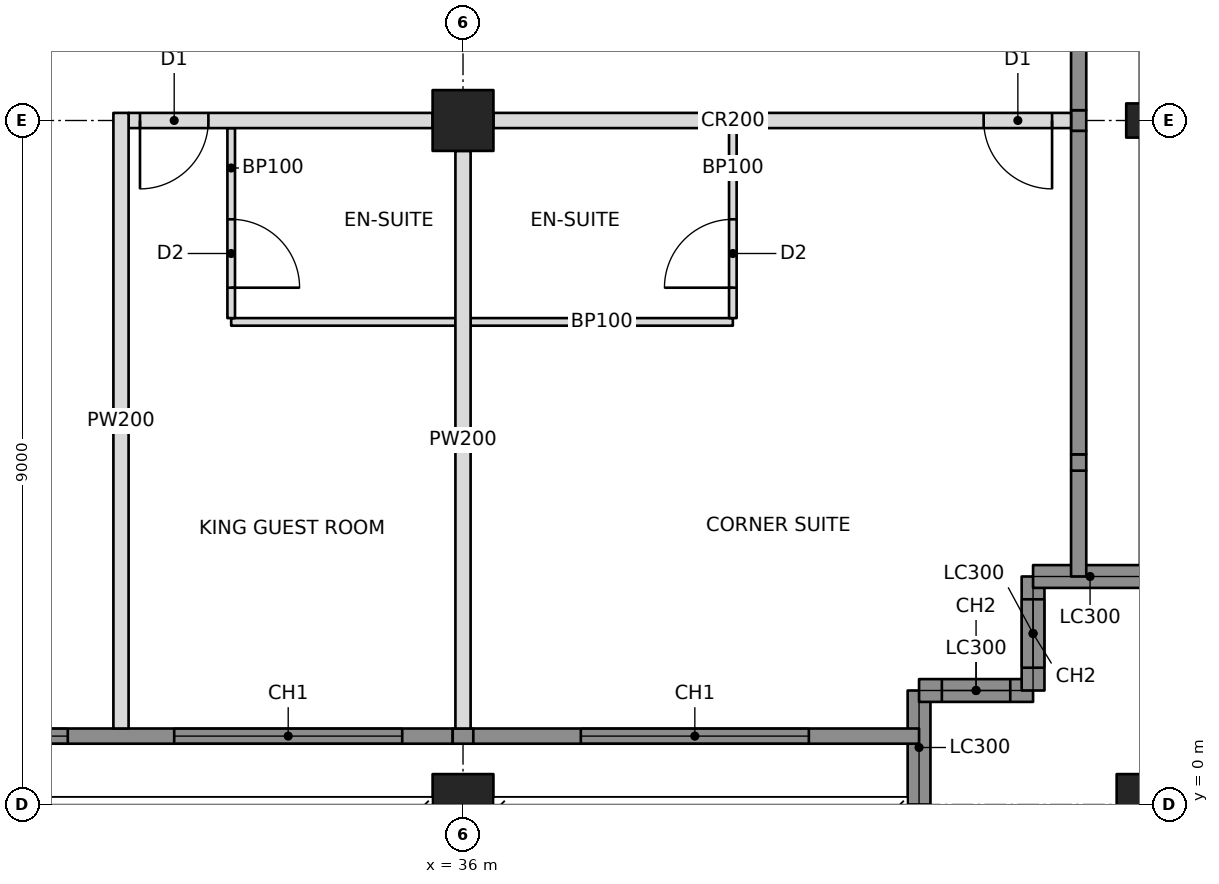
"""IFC4 building model, lengths in metres.
Left out: names, types, materials, properties, quantities, classifications, styles, units other than length and angle.
Written with IfcOpenShell. Run it as: python <this file> out.ifc"""

import sys

from ifc_helpers import new_model, si_unit, direction, frame, frame_2d, origin, origin_2d, place, context, subcontext, project, spatial, rectangle, hollow_rectangle, i_section, extrude, element, fill, save


model = new_model("IFC4")
c1 = context("Model", 3, precision=1e-05, world=origin(), true_north=direction((0.0, 1.0)))
c2 = subcontext(c1, "Body", "Model", "MODEL_VIEW")
j1 = project(units=[si_unit("LENGTHUNIT", "METRE"), si_unit("PLANEANGLEUNIT", "RADIAN")], contexts=[c1])
p1 = place(None, origin())
s1 = spatial("IfcSite", under=j1, at=p1, CompositionType="ELEMENT")
p2 = place(p1, origin())
s2 = spatial("IfcBuilding", under=s1, at=p2, CompositionType="ELEMENT")
p3 = place(p2, frame((0.0, 0.0, 170.6)))
s3 = spatial("IfcBuildingStorey", under=s2, at=p3, CompositionType="ELEMENT", Elevation=170.6)
p4 = place(p3, frame((36.0, 0.0, 0.0), z_axis=(0.0, 0.0, 1.0), x_axis=(1.0, 0.0, 0.0)))
e1 = element("IfcColumn", 1, at=p4, inside=s3, PredefinedType="COLUMN", context=c2, shape_type="SweptSolid", body=[
    extrude(hollow_rectangle(XDim=0.8, YDim=0.8, WallThickness=0.07, at=origin_2d()), origin(), (0.0, 0.0, 1.0), 3.4),
])
p5 = place(p3, frame((36.0, 9.0, 0.0), z_axis=(0.0, 0.0, 1.0), x_axis=(0.0, 1.0, 0.0)))
e2 = element("IfcColumn", 2, at=p5, inside=s3, PredefinedType="COLUMN", context=c2, shape_type="SweptSolid", body=[
    extrude(hollow_rectangle(XDim=0.8, YDim=0.8, WallThickness=0.06, at=origin_2d()), origin(), (0.0, 0.0, 1.0), 3.4),
])
p6 = place(p3, frame((45.0, 0.0, 0.0), z_axis=(0.0, 0.0, 1.0), x_axis=(1.0, 0.0, 0.0)))
e3 = element("IfcColumn", 3, at=p6, inside=s3, PredefinedType="COLUMN", context=c2, shape_type="SweptSolid", body=[
    extrude(hollow_rectangle(XDim=0.8, YDim=0.8, WallThickness=0.07, at=origin_2d()), origin(), (0.0, 0.0, 1.0), 3.4),
])
p7 = place(p3, frame((45.0, 9.0, 0.0), z_axis=(0.0, 0.0, 1.0), x_axis=(0.0, 1.0, 0.0)))
e4 = element("IfcColumn", 4, at=p7, inside=s3, PredefinedType="COLUMN", context=c2, shape_type="SweptSolid", body=[
    extrude(i_section(OverallWidth=0.449, OverallDepth=0.549, WebThickness=0.072, FlangeThickness=0.115, at=origin_2d()), origin(), (0.0, 0.0, 1.0), 3.4),
])
p8 = place(p3, frame((42.0, 0.0, 0.0), z_axis=(0.0, 0.0, 1.0), x_axis=(0.0, 1.0, 0.0)))
e5 = element("IfcWall", 5, at=p8, inside=s3, PredefinedType="SOLIDWALL", context=c2, shape_type="SweptSolid", body=[
    extrude(rectangle(XDim=1.5, YDim=0.3, at=frame_2d((0.75, 0.0))), origin(), (0.0, 0.0, 1.0), 2.42),
])
p9 = place(p3, frame((42.0, 1.5, 0.0), z_axis=(0.0, 0.0, 1.0), x_axis=(1.0, 0.0, 0.0)))
e6 = element("IfcWall", 6, at=p9, inside=s3, PredefinedType="SOLIDWALL", context=c2, shape_type="SweptSolid", body=[
    extrude(rectangle(XDim=1.5, YDim=0.3, at=frame_2d((0.75, 0.0))), origin(), (0.0, 0.0, 1.0), 3.2),
])
p10 = place(p9, frame((0.3, 0.0, 0.6)))
e7 = element("IfcOpeningElement", 7, at=p10, cuts=e6, PredefinedType="OPENING", context=c2, shape_type="SweptSolid", body=[
    extrude(rectangle(XDim=0.9, YDim=2.2, at=frame_2d((0.45, 1.1))), frame((0.0, 0.16, 0.0), z_axis=(0.0, -1.0, 0.0), x_axis=(1.0, 0.0, 0.0)), (0.0, 0.0, 1.0), 0.32),
])
p11 = place(p3, frame((43.5, 1.5, 0.0), z_axis=(0.0, 0.0, 1.0), x_axis=(0.0, 1.0, 0.0)))
e8 = element("IfcWall", 8, at=p11, inside=s3, PredefinedType="SOLIDWALL", context=c2, shape_type="SweptSolid", body=[
    extrude(rectangle(XDim=1.5, YDim=0.3, at=frame_2d((0.75, 0.0))), origin(), (0.0, 0.0, 1.0), 3.2),
])
p12 = place(p11, frame((0.3, 0.0, 0.6)))
e9 = element("IfcOpeningElement", 9, at=p12, cuts=e8, PredefinedType="OPENING", context=c2, shape_type="SweptSolid", body=[
    extrude(rectangle(XDim=0.9, YDim=2.2, at=frame_2d((0.45, 1.1))), frame((0.0, 0.16, 0.0), z_axis=(0.0, -1.0, 0.0), x_axis=(1.0, 0.0, 0.0)), (0.0, 0.0, 1.0), 0.32),
])
p13 = place(p3, frame((43.5, 3.0, 0.0), z_axis=(0.0, 0.0, 1.0), x_axis=(1.0, 0.0, 0.0)))
e10 = element("IfcWall", 10, at=p13, inside=s3, PredefinedType="SOLIDWALL", context=c2, shape_type="SweptSolid", body=[
    extrude(rectangle(XDim=1.5, YDim=0.3, at=frame_2d((0.75, 0.0))), origin(), (0.0, 0.0, 1.0), 2.42),
])
p14 = place(p3, frame((44.1, 3.0, 0.0), z_axis=(0.0, 0.0, 1.0), x_axis=(0.0, 1.0, 0.0)))
e11 = element("IfcWall", 11, at=p14, inside=s3, PredefinedType="SOLIDWALL", context=c2, shape_type="SweptSolid", body=[
    extrude(rectangle(XDim=1.393, YDim=0.2, at=frame_2d((0.696, 0.0))), origin(), (0.0, 0.0, 1.0), 3.2),
])
p15 = place(p3, frame((31.6, 9.0, 0.0), z_axis=(0.0, 0.0, 1.0), x_axis=(1.0, 0.0, 0.0)))
e12 = element("IfcWall", 12, at=p15, inside=s3, PredefinedType="PARTITIONING", context=c2, shape_type="SweptSolid", body=[
    extrude(rectangle(XDim=4.0, YDim=0.2, at=frame_2d((2.0, 0.0))), origin(), (0.0, 0.0, 1.0), 2.405),
])
p16 = place(p15, frame((0.15, 0.0, 0.0)))
e13 = element("IfcOpeningElement", 13, at=p16, cuts=e12, PredefinedType="OPENING", context=c2, shape_type="SweptSolid", body=[
    extrude(rectangle(XDim=0.9, YDim=2.1, at=frame_2d((0.45, 1.05))), frame((0.0, 0.11, 0.0), z_axis=(0.0, -1.0, 0.0), x_axis=(1.0, 0.0, 0.0)), (0.0, 0.0, 1.0), 0.22),
])
p17 = place(p3, frame((36.4, 9.0, 0.0), z_axis=(0.0, 0.0, 1.0), x_axis=(1.0, 0.0, 0.0)))
e14 = element("IfcWall", 14, at=p17, inside=s3, PredefinedType="PARTITIONING", context=c2, shape_type="SweptSolid", body=[
    extrude(rectangle(XDim=7.6, YDim=0.2, at=frame_2d((3.8, 0.0))), origin(), (0.0, 0.0, 1.0), 2.438),
])
p18 = place(p17, frame((6.45, 0.0, 0.0)))
e15 = element("IfcOpeningElement", 15, at=p18, cuts=e14, PredefinedType="OPENING", context=c2, shape_type="SweptSolid", body=[
    extrude(rectangle(XDim=0.9, YDim=2.1, at=frame_2d((0.45, 1.05))), frame((0.0, 0.11, 0.0), z_axis=(0.0, -1.0, 0.0), x_axis=(1.0, 0.0, 0.0)), (0.0, 0.0, 1.0), 0.22),
])
p19 = place(p3, frame((31.5, 9.1, 0.0), z_axis=(0.0, 0.0, 1.0), x_axis=(0.0, -1.0, 0.0)))
e16 = element("IfcWall", 16, at=p19, inside=s3, PredefinedType="PARTITIONING", context=c2, shape_type="SweptSolid", body=[
    extrude(rectangle(XDim=8.1, YDim=0.2, at=frame_2d((4.05, 0.0))), origin(), (0.0, 0.0, 1.0), 2.404),
])
p20 = place(p3, frame((36.0, 8.6, 0.0), z_axis=(0.0, 0.0, 1.0), x_axis=(0.0, -1.0, 0.0)))
e17 = element("IfcWall", 17, at=p20, inside=s3, PredefinedType="PARTITIONING", context=c2, shape_type="SweptSolid", body=[
    extrude(rectangle(XDim=7.6, YDim=0.2, at=frame_2d((3.8, 0.0))), origin(), (0.0, 0.0, 1.0), 2.438),
])
p21 = place(p3, frame((32.95, 6.35, 0.0), z_axis=(0.0, 0.0, 1.0), x_axis=(1.0, 0.0, 0.0)))
e18 = element("IfcWall", 18, at=p21, inside=s3, PredefinedType="PARTITIONING", context=c2, shape_type="SweptSolid", body=[
    extrude(rectangle(XDim=2.95, YDim=0.1, at=frame_2d((1.475, 0.0))), origin(), (0.0, 0.0, 1.0), 2.438),
])
p22 = place(p3, frame((32.95, 8.9, 0.0), z_axis=(0.0, 0.0, 1.0), x_axis=(0.0, -1.0, 0.0)))
e19 = element("IfcWall", 19, at=p22, inside=s3, PredefinedType="PARTITIONING", context=c2, shape_type="SweptSolid", body=[
    extrude(rectangle(XDim=2.5, YDim=0.1, at=frame_2d((1.25, 0.0))), origin(), (0.0, 0.0, 1.0), 2.404),
])
p23 = place(p22, frame((1.2, 0.0, 0.0)))
e20 = element("IfcOpeningElement", 20, at=p23, cuts=e19, PredefinedType="OPENING", context=c2, shape_type="SweptSolid", body=[
    extrude(rectangle(XDim=0.9, YDim=2.1, at=frame_2d((0.45, 1.05))), frame((0.0, 0.06, 0.0), z_axis=(0.0, -1.0, 0.0), x_axis=(1.0, 0.0, 0.0)), (0.0, 0.0, 1.0), 0.12),
])
p24 = place(p3, frame((36.1, 6.35, 0.0), z_axis=(0.0, 0.0, 1.0), x_axis=(1.0, 0.0, 0.0)))
e21 = element("IfcWall", 21, at=p24, inside=s3, PredefinedType="PARTITIONING", context=c2, shape_type="SweptSolid", body=[
    extrude(rectangle(XDim=3.45, YDim=0.1, at=frame_2d((1.725, 0.0))), origin(), (0.0, 0.0, 1.0), 2.438),
])
p25 = place(p3, frame((39.55, 8.9, 0.0), z_axis=(0.0, 0.0, 1.0), x_axis=(0.0, -1.0, 0.0)))
e22 = element("IfcWall", 22, at=p25, inside=s3, PredefinedType="PARTITIONING", context=c2, shape_type="SweptSolid", body=[
    extrude(rectangle(XDim=2.5, YDim=0.1, at=frame_2d((1.25, 0.0))), origin(), (0.0, 0.0, 1.0), 2.438),
])
p26 = place(p25, frame((1.2, 0.0, 0.0)))
e23 = element("IfcOpeningElement", 23, at=p26, cuts=e22, PredefinedType="OPENING", context=c2, shape_type="SweptSolid", body=[
    extrude(rectangle(XDim=0.9, YDim=2.1, at=frame_2d((0.45, 1.05))), frame((0.0, 0.06, 0.0), z_axis=(0.0, -1.0, 0.0), x_axis=(1.0, 0.0, 0.0)), (0.0, 0.0, 1.0), 0.12),
])
p27 = place(p3, frame((27.194, 0.9, 0.0), z_axis=(0.0, 0.0, 1.0), x_axis=(1.0, 0.0, 0.0)))
e24 = element("IfcWall", 24, at=p27, inside=s3, PredefinedType="SOLIDWALL", context=c2, shape_type="SweptSolid", body=[
    extrude(rectangle(XDim=8.671, YDim=0.2, at=frame_2d((4.335, 0.0))), origin(), (0.0, 0.0, 1.0), 3.2),
])
p28 = place(p27, frame((0.606, 0.0, 0.6)))
e25 = element("IfcOpeningElement", 25, at=p28, cuts=e24, PredefinedType="OPENING", context=c2, shape_type="SweptSolid", body=[
    extrude(rectangle(XDim=3.0, YDim=2.2, at=frame_2d((1.5, 1.1))), frame((0.0, 0.11, 0.0), z_axis=(0.0, -1.0, 0.0), x_axis=(1.0, 0.0, 0.0)), (0.0, 0.0, 1.0), 0.22),
])
p29 = place(p27, frame((5.006, 0.0, 0.6)))
e26 = element("IfcOpeningElement", 26, at=p29, cuts=e24, PredefinedType="OPENING", context=c2, shape_type="SweptSolid", body=[
    extrude(rectangle(XDim=3.0, YDim=2.2, at=frame_2d((1.5, 1.1))), frame((0.0, 0.11, 0.0), z_axis=(0.0, -1.0, 0.0), x_axis=(1.0, 0.0, 0.0)), (0.0, 0.0, 1.0), 0.22),
])
p30 = place(p3, frame((35.865, 0.9, 0.0), z_axis=(0.0, 0.0, 1.0), x_axis=(1.0, 0.0, 0.0)))
e27 = element("IfcWall", 27, at=p30, inside=s3, PredefinedType="SOLIDWALL", context=c2, shape_type="SweptSolid", body=[
    extrude(rectangle(XDim=0.271, YDim=0.2, at=frame_2d((0.135, 0.0))), origin(), (0.0, 0.0, 1.0), 2.438),
])
p31 = place(p3, frame((36.135, 0.9, 0.0), z_axis=(0.0, 0.0, 1.0), x_axis=(1.0, 0.0, 0.0)))
e28 = element("IfcWall", 28, at=p31, inside=s3, PredefinedType="SOLIDWALL", context=c2, shape_type="SweptSolid", body=[
    extrude(rectangle(XDim=5.865, YDim=0.2, at=frame_2d((2.932, 0.0))), origin(), (0.0, 0.0, 1.0), 3.2),
])
p32 = place(p31, frame((1.415, 0.0, 0.6)))
e29 = element("IfcOpeningElement", 29, at=p32, cuts=e28, PredefinedType="OPENING", context=c2, shape_type="SweptSolid", body=[
    extrude(rectangle(XDim=3.0, YDim=2.2, at=frame_2d((1.5, 1.1))), frame((0.0, 0.11, 0.0), z_axis=(0.0, -1.0, 0.0), x_axis=(1.0, 0.0, 0.0)), (0.0, 0.0, 1.0), 0.22),
])
p33 = place(p3, frame((44.1, 4.393, 0.0), z_axis=(0.0, 0.0, 1.0), x_axis=(0.0, 1.0, 0.0)))
e30 = element("IfcWall", 30, at=p33, inside=s3, PredefinedType="SOLIDWALL", context=c2, shape_type="SweptSolid", body=[
    extrude(rectangle(XDim=0.215, YDim=0.2, at=frame_2d((0.107, 0.0))), origin(), (0.0, 0.0, 1.0), 2.661),
])
p34 = place(p3, frame((44.1, 4.607, 0.0), z_axis=(0.0, 0.0, 1.0), x_axis=(0.0, 1.0, 0.0)))
e31 = element("IfcWall", 31, at=p34, inside=s3, PredefinedType="SOLIDWALL", context=c2, shape_type="SweptSolid", body=[
    extrude(rectangle(XDim=4.257, YDim=0.2, at=frame_2d((2.129, 0.0))), origin(), (0.0, 0.0, 1.0), 3.2),
])
p35 = place(p3, frame((44.1, 8.865, 0.0), z_axis=(0.0, 0.0, 1.0), x_axis=(0.0, 1.0, 0.0)))
e32 = element("IfcWall", 32, at=p35, inside=s3, PredefinedType="SOLIDWALL", context=c2, shape_type="SweptSolid", body=[
    extrude(rectangle(XDim=0.271, YDim=0.2, at=frame_2d((0.135, 0.0))), origin(), (0.0, 0.0, 1.0), 2.438),
])
p36 = place(p3, frame((44.1, 9.135, 0.0), z_axis=(0.0, 0.0, 1.0), x_axis=(0.0, 1.0, 0.0)))
e33 = element("IfcWall", 33, at=p36, inside=s3, PredefinedType="SOLIDWALL", context=c2, shape_type="SweptSolid", body=[
    extrude(rectangle(XDim=8.671, YDim=0.2, at=frame_2d((4.335, 0.0))), origin(), (0.0, 0.0, 1.0), 3.2),
])
p37 = place(p36, frame((2.015, 0.0, 0.6)))
e34 = element("IfcOpeningElement", 34, at=p37, cuts=e33, PredefinedType="OPENING", context=c2, shape_type="SweptSolid", body=[
    extrude(rectangle(XDim=3.0, YDim=2.2, at=frame_2d((1.5, 1.1))), frame((0.0, 0.11, 0.0), z_axis=(0.0, -1.0, 0.0), x_axis=(1.0, 0.0, 0.0)), (0.0, 0.0, 1.0), 0.22),
])
p38 = place(p36, frame((5.515, 0.0, 0.6)))
e35 = element("IfcOpeningElement", 35, at=p38, cuts=e33, PredefinedType="OPENING", context=c2, shape_type="SweptSolid", body=[
    extrude(rectangle(XDim=3.0, YDim=2.2, at=frame_2d((1.5, 1.1))), frame((0.0, 0.11, 0.0), z_axis=(0.0, -1.0, 0.0), x_axis=(1.0, 0.0, 0.0)), (0.0, 0.0, 1.0), 0.22),
])
p39 = place(p10, origin())
e36 = element("IfcWindow", 36, at=p39, inside=s3, PartitioningType="SINGLE_PANEL", PredefinedType="WINDOW", context=c2, shape_type="SweptSolid", body=[
    extrude(rectangle(XDim=0.9, YDim=2.2, at=frame_2d((0.45, 1.1))), frame((0.0, 0.03, 0.0), z_axis=(0.0, -1.0, 0.0), x_axis=(1.0, 0.0, 0.0)), (0.0, 0.0, 1.0), 0.06),
])
fill(e7, e36)
p40 = place(p12, origin())
e37 = element("IfcWindow", 37, at=p40, inside=s3, PartitioningType="SINGLE_PANEL", PredefinedType="WINDOW", context=c2, shape_type="SweptSolid", body=[
    extrude(rectangle(XDim=0.9, YDim=2.2, at=frame_2d((0.45, 1.1))), frame((0.0, 0.03, 0.0), z_axis=(0.0, -1.0, 0.0), x_axis=(1.0, 0.0, 0.0)), (0.0, 0.0, 1.0), 0.06),
])
fill(e9, e37)
p41 = place(p28, origin())
e38 = element("IfcWindow", 38, at=p41, inside=s3, PartitioningType="TRIPLE_PANEL_VERTICAL", PredefinedType="WINDOW", context=c2, shape_type="SweptSolid", body=[
    extrude(rectangle(XDim=3.0, YDim=2.2, at=frame_2d((1.5, 1.1))), frame((0.0, 0.03, 0.0), z_axis=(0.0, -1.0, 0.0), x_axis=(1.0, 0.0, 0.0)), (0.0, 0.0, 1.0), 0.06),
])
fill(e25, e38)
p42 = place(p29, origin())
e39 = element("IfcWindow", 39, at=p42, inside=s3, PartitioningType="TRIPLE_PANEL_VERTICAL", PredefinedType="WINDOW", context=c2, shape_type="SweptSolid", body=[
    extrude(rectangle(XDim=3.0, YDim=2.2, at=frame_2d((1.5, 1.1))), frame((0.0, 0.03, 0.0), z_axis=(0.0, -1.0, 0.0), x_axis=(1.0, 0.0, 0.0)), (0.0, 0.0, 1.0), 0.06),
])
fill(e26, e39)
p43 = place(p32, origin())
e40 = element("IfcWindow", 40, at=p43, inside=s3, PartitioningType="TRIPLE_PANEL_VERTICAL", PredefinedType="WINDOW", context=c2, shape_type="SweptSolid", body=[
    extrude(rectangle(XDim=3.0, YDim=2.2, at=frame_2d((1.5, 1.1))), frame((0.0, 0.03, 0.0), z_axis=(0.0, -1.0, 0.0), x_axis=(1.0, 0.0, 0.0)), (0.0, 0.0, 1.0), 0.06),
])
fill(e29, e40)
p44 = place(p23, origin())
e41 = element("IfcDoor", 41, at=p44, inside=s3, OperationType="SINGLE_SWING_RIGHT", PredefinedType="DOOR", context=c2, shape_type="SweptSolid", body=[
    extrude(rectangle(XDim=0.9, YDim=2.1, at=frame_2d((0.45, 1.05))), frame((0.0, 0.025, 0.0), z_axis=(0.0, -1.0, 0.0), x_axis=(1.0, 0.0, 0.0)), (0.0, 0.0, 1.0), 0.05),
])
fill(e20, e41)
p45 = place(p16, frame((0.9, 0.0, 0.0), z_axis=(0.0, 0.0, 1.0), x_axis=(-1.0, 0.0, 0.0)))
e42 = element("IfcDoor", 42, at=p45, inside=s3, OperationType="SINGLE_SWING_RIGHT", PredefinedType="DOOR", context=c2, shape_type="SweptSolid", body=[
    extrude(rectangle(XDim=0.9, YDim=2.1, at=frame_2d((0.45, 1.05))), frame((0.0, 0.025, 0.0), z_axis=(0.0, -1.0, 0.0), x_axis=(1.0, 0.0, 0.0)), (0.0, 0.0, 1.0), 0.05),
])
fill(e13, e42)
p46 = place(p26, frame((0.9, 0.0, 0.0), z_axis=(0.0, 0.0, 1.0), x_axis=(-1.0, 0.0, 0.0)))
e43 = element("IfcDoor", 43, at=p46, inside=s3, OperationType="SINGLE_SWING_LEFT", PredefinedType="DOOR", context=c2, shape_type="SweptSolid", body=[
    extrude(rectangle(XDim=0.9, YDim=2.1, at=frame_2d((0.45, 1.05))), frame((0.0, 0.025, 0.0), z_axis=(0.0, -1.0, 0.0), x_axis=(1.0, 0.0, 0.0)), (0.0, 0.0, 1.0), 0.05),
])
fill(e23, e43)
p47 = place(p18, frame((0.9, 0.0, 0.0), z_axis=(0.0, 0.0, 1.0), x_axis=(-1.0, 0.0, 0.0)))
e44 = element("IfcDoor", 44, at=p47, inside=s3, OperationType="SINGLE_SWING_LEFT", PredefinedType="DOOR", context=c2, shape_type="SweptSolid", body=[
    extrude(rectangle(XDim=0.9, YDim=2.1, at=frame_2d((0.45, 1.05))), frame((0.0, 0.025, 0.0), z_axis=(0.0, -1.0, 0.0), x_axis=(1.0, 0.0, 0.0)), (0.0, 0.0, 1.0), 0.05),
])
fill(e15, e44)
save(model, sys.argv[1])
